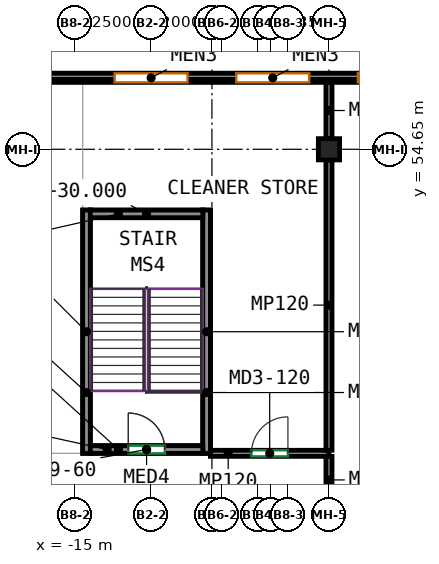
"""IFC4 building model, lengths in metres.
Left out: names, types, materials, properties, quantities, classifications, styles, units other than length and angle.
Written with IfcOpenShell. Run it as: python <this file> out.ifc"""

import sys

from ifc_helpers import new_model, si_unit, direction, frame, frame_2d, origin, origin_2d, place, context, subcontext, project, spatial, rectangle, extrude, source, transform, mapped, element, fill, save


model = new_model("IFC4")
c1 = context("Model", 3, precision=1e-05, world=origin(), true_north=direction((0.0, 1.0)))
c2 = subcontext(c1, "Body", "Model", "MODEL_VIEW")
j1 = project(units=[si_unit("LENGTHUNIT", "METRE"), si_unit("PLANEANGLEUNIT", "RADIAN")], contexts=[c1])
p1 = place(None, origin())
s1 = spatial("IfcSite", under=j1, at=p1, CompositionType="ELEMENT")
p2 = place(p1, origin())
s2 = spatial("IfcBuilding", under=s1, at=p2, CompositionType="ELEMENT")
p3 = place(p2, frame((0.0, 0.0, 22.5)))
s3 = spatial("IfcBuildingStorey", under=s2, at=p3, CompositionType="ELEMENT", Elevation=22.5)
m1 = source(origin(), c2, "Body", "SweptSolid", [
    extrude(rectangle(XDim=0.7, YDim=0.7, at=origin_2d()), origin(), (0.0, 0.0, 1.0), 4.22),
])
p4 = place(p3, frame((-6.65, 54.65, 0.0), z_axis=(0.0, 0.0, 1.0), x_axis=(1.0, 0.0, 0.0)))
e1 = element("IfcColumn", 1, at=p4, inside=s3, PredefinedType="COLUMN", context=c2, shape_type="MappedRepresentation", body=[
    mapped(m1, transform((0.0, 0.0, 0.0))),
])
m2 = source(origin(), c2, "Body", "SweptSolid", [
    extrude(rectangle(XDim=8.0, YDim=0.25, at=frame_2d((4.0, 0.0))), origin(), (0.0, 0.0, 1.0), 4.22),
])
for number, where, z_axis, x_axis in (
    (2, (-14.625, 44.65, 0.0), (0.0, 0.0, 1.0), (0.0, 1.0, 0.0)),
    (3, (-10.675, 44.65, 0.0), (0.0, 0.0, 1.0), (0.0, 1.0, 0.0)),
):
    element("IfcWall", number, at=place(p3, frame(where, z_axis=z_axis, x_axis=x_axis)), inside=s3, PredefinedType="SHEAR", context=c2, shape_type="MappedRepresentation", body=[
        mapped(m2, transform((0.0, 0.0, 0.0))),
    ])
m3 = source(origin(), c2, "Body", "SweptSolid", [
    extrude(rectangle(XDim=3.7, YDim=0.25, at=frame_2d((1.85, 0.0))), origin(), (0.0, 0.0, 1.0), 4.22),
])
p5 = place(p3, frame((-14.5, 44.775, 0.0), z_axis=(0.0, 0.0, 1.0), x_axis=(1.0, 0.0, 0.0)))
e4 = element("IfcWall", 4, at=p5, inside=s3, PredefinedType="SHEAR", context=c2, shape_type="MappedRepresentation", body=[
    mapped(m3, transform((0.0, 0.0, 0.0))),
])
p6 = place(p5, frame((1.25, 0.0, 0.0)))
e5 = element("IfcOpeningElement", 5, at=p6, cuts=e4, PredefinedType="OPENING", context=c2, shape_type="SweptSolid", body=[
    extrude(rectangle(XDim=1.2, YDim=2.1, at=frame_2d((0.6, 1.05))), frame((0.0, 0.135, 0.0), z_axis=(0.0, -1.0, 0.0), x_axis=(1.0, 0.0, 0.0)), (0.0, 0.0, 1.0), 0.27),
])
p7 = place(p3, frame((-14.5, 52.525, 0.0), z_axis=(0.0, 0.0, 1.0), x_axis=(1.0, 0.0, 0.0)))
e6 = element("IfcWall", 6, at=p7, inside=s3, PredefinedType="SHEAR", context=c2, shape_type="MappedRepresentation", body=[
    mapped(m3, transform((0.0, 0.0, 0.0))),
])
m4 = source(origin(), c2, "Body", "SweptSolid", [
    extrude(rectangle(XDim=112.7, YDim=0.3, at=frame_2d((56.35, 0.0))), origin(), (0.0, 0.0, 1.0), 4.22),
])
p8 = place(p3, frame((-56.85, 57.0, 0.0), z_axis=(0.0, 0.0, 1.0), x_axis=(1.0, 0.0, 0.0)))
e7 = element("IfcWall", 7, at=p8, inside=s3, PredefinedType="SOLIDWALL", context=c2, shape_type="MappedRepresentation", body=[
    mapped(m4, transform((0.0, 0.0, 0.0))),
])
p9 = place(p8, frame((3.15, 0.0, 0.9)))
e8 = element("IfcOpeningElement", 8, at=p9, cuts=e7, PredefinedType="OPENING", context=c2, shape_type="SweptSolid", body=[
    extrude(rectangle(XDim=2.4, YDim=1.8, at=frame_2d((1.2, 0.9))), frame((0.0, 0.16, 0.0), z_axis=(0.0, -1.0, 0.0), x_axis=(1.0, 0.0, 0.0)), (0.0, 0.0, 1.0), 0.32),
])
p10 = place(p8, frame((7.15, 0.0, 0.9)))
e9 = element("IfcOpeningElement", 9, at=p10, cuts=e7, PredefinedType="OPENING", context=c2, shape_type="SweptSolid", body=[
    extrude(rectangle(XDim=2.4, YDim=1.8, at=frame_2d((1.2, 0.9))), frame((0.0, 0.16, 0.0), z_axis=(0.0, -1.0, 0.0), x_axis=(1.0, 0.0, 0.0)), (0.0, 0.0, 1.0), 0.32),
])
p11 = place(p8, frame((11.15, 0.0, 0.9)))
e10 = element("IfcOpeningElement", 10, at=p11, cuts=e7, PredefinedType="OPENING", context=c2, shape_type="SweptSolid", body=[
    extrude(rectangle(XDim=2.4, YDim=1.8, at=frame_2d((1.2, 0.9))), frame((0.0, 0.16, 0.0), z_axis=(0.0, -1.0, 0.0), x_axis=(1.0, 0.0, 0.0)), (0.0, 0.0, 1.0), 0.32),
])
p12 = place(p8, frame((15.15, 0.0, 0.9)))
e11 = element("IfcOpeningElement", 11, at=p12, cuts=e7, PredefinedType="OPENING", context=c2, shape_type="SweptSolid", body=[
    extrude(rectangle(XDim=2.4, YDim=1.8, at=frame_2d((1.2, 0.9))), frame((0.0, 0.16, 0.0), z_axis=(0.0, -1.0, 0.0), x_axis=(1.0, 0.0, 0.0)), (0.0, 0.0, 1.0), 0.32),
])
p13 = place(p8, frame((19.15, 0.0, 0.9)))
e12 = element("IfcOpeningElement", 12, at=p13, cuts=e7, PredefinedType="OPENING", context=c2, shape_type="SweptSolid", body=[
    extrude(rectangle(XDim=2.4, YDim=1.8, at=frame_2d((1.2, 0.9))), frame((0.0, 0.16, 0.0), z_axis=(0.0, -1.0, 0.0), x_axis=(1.0, 0.0, 0.0)), (0.0, 0.0, 1.0), 0.32),
])
p14 = place(p8, frame((23.15, 0.0, 0.9)))
e13 = element("IfcOpeningElement", 13, at=p14, cuts=e7, PredefinedType="OPENING", context=c2, shape_type="SweptSolid", body=[
    extrude(rectangle(XDim=2.4, YDim=1.8, at=frame_2d((1.2, 0.9))), frame((0.0, 0.16, 0.0), z_axis=(0.0, -1.0, 0.0), x_axis=(1.0, 0.0, 0.0)), (0.0, 0.0, 1.0), 0.32),
])
p15 = place(p8, frame((27.15, 0.0, 0.9)))
e14 = element("IfcOpeningElement", 14, at=p15, cuts=e7, PredefinedType="OPENING", context=c2, shape_type="SweptSolid", body=[
    extrude(rectangle(XDim=2.4, YDim=1.8, at=frame_2d((1.2, 0.9))), frame((0.0, 0.16, 0.0), z_axis=(0.0, -1.0, 0.0), x_axis=(1.0, 0.0, 0.0)), (0.0, 0.0, 1.0), 0.32),
])
p16 = place(p8, frame((31.15, 0.0, 0.9)))
e15 = element("IfcOpeningElement", 15, at=p16, cuts=e7, PredefinedType="OPENING", context=c2, shape_type="SweptSolid", body=[
    extrude(rectangle(XDim=2.4, YDim=1.8, at=frame_2d((1.2, 0.9))), frame((0.0, 0.16, 0.0), z_axis=(0.0, -1.0, 0.0), x_axis=(1.0, 0.0, 0.0)), (0.0, 0.0, 1.0), 0.32),
])
p17 = place(p8, frame((35.15, 0.0, 0.9)))
e16 = element("IfcOpeningElement", 16, at=p17, cuts=e7, PredefinedType="OPENING", context=c2, shape_type="SweptSolid", body=[
    extrude(rectangle(XDim=2.4, YDim=1.8, at=frame_2d((1.2, 0.9))), frame((0.0, 0.16, 0.0), z_axis=(0.0, -1.0, 0.0), x_axis=(1.0, 0.0, 0.0)), (0.0, 0.0, 1.0), 0.32),
])
p18 = place(p8, frame((43.15, 0.0, 0.9)))
e17 = element("IfcOpeningElement", 17, at=p18, cuts=e7, PredefinedType="OPENING", context=c2, shape_type="SweptSolid", body=[
    extrude(rectangle(XDim=2.4, YDim=1.8, at=frame_2d((1.2, 0.9))), frame((0.0, 0.16, 0.0), z_axis=(0.0, -1.0, 0.0), x_axis=(1.0, 0.0, 0.0)), (0.0, 0.0, 1.0), 0.32),
])
p19 = place(p8, frame((47.15, 0.0, 0.9)))
e18 = element("IfcOpeningElement", 18, at=p19, cuts=e7, PredefinedType="OPENING", context=c2, shape_type="SweptSolid", body=[
    extrude(rectangle(XDim=2.4, YDim=1.8, at=frame_2d((1.2, 0.9))), frame((0.0, 0.16, 0.0), z_axis=(0.0, -1.0, 0.0), x_axis=(1.0, 0.0, 0.0)), (0.0, 0.0, 1.0), 0.32),
])
p20 = place(p8, frame((51.15, 0.0, 0.9)))
e19 = element("IfcOpeningElement", 19, at=p20, cuts=e7, PredefinedType="OPENING", context=c2, shape_type="SweptSolid", body=[
    extrude(rectangle(XDim=2.4, YDim=1.8, at=frame_2d((1.2, 0.9))), frame((0.0, 0.16, 0.0), z_axis=(0.0, -1.0, 0.0), x_axis=(1.0, 0.0, 0.0)), (0.0, 0.0, 1.0), 0.32),
])
p21 = place(p8, frame((55.15, 0.0, 0.9)))
e20 = element("IfcOpeningElement", 20, at=p21, cuts=e7, PredefinedType="OPENING", context=c2, shape_type="SweptSolid", body=[
    extrude(rectangle(XDim=2.4, YDim=1.8, at=frame_2d((1.2, 0.9))), frame((0.0, 0.16, 0.0), z_axis=(0.0, -1.0, 0.0), x_axis=(1.0, 0.0, 0.0)), (0.0, 0.0, 1.0), 0.32),
])
p22 = place(p8, frame((59.15, 0.0, 0.9)))
e21 = element("IfcOpeningElement", 21, at=p22, cuts=e7, PredefinedType="OPENING", context=c2, shape_type="SweptSolid", body=[
    extrude(rectangle(XDim=2.4, YDim=1.8, at=frame_2d((1.2, 0.9))), frame((0.0, 0.16, 0.0), z_axis=(0.0, -1.0, 0.0), x_axis=(1.0, 0.0, 0.0)), (0.0, 0.0, 1.0), 0.32),
])
p23 = place(p8, frame((63.15, 0.0, 0.9)))
e22 = element("IfcOpeningElement", 22, at=p23, cuts=e7, PredefinedType="OPENING", context=c2, shape_type="SweptSolid", body=[
    extrude(rectangle(XDim=2.4, YDim=1.8, at=frame_2d((1.2, 0.9))), frame((0.0, 0.16, 0.0), z_axis=(0.0, -1.0, 0.0), x_axis=(1.0, 0.0, 0.0)), (0.0, 0.0, 1.0), 0.32),
])
p24 = place(p8, frame((67.15, 0.0, 0.9)))
e23 = element("IfcOpeningElement", 23, at=p24, cuts=e7, PredefinedType="OPENING", context=c2, shape_type="SweptSolid", body=[
    extrude(rectangle(XDim=2.4, YDim=1.8, at=frame_2d((1.2, 0.9))), frame((0.0, 0.16, 0.0), z_axis=(0.0, -1.0, 0.0), x_axis=(1.0, 0.0, 0.0)), (0.0, 0.0, 1.0), 0.32),
])
p25 = place(p8, frame((71.15, 0.0, 0.9)))
e24 = element("IfcOpeningElement", 24, at=p25, cuts=e7, PredefinedType="OPENING", context=c2, shape_type="SweptSolid", body=[
    extrude(rectangle(XDim=2.4, YDim=1.8, at=frame_2d((1.2, 0.9))), frame((0.0, 0.16, 0.0), z_axis=(0.0, -1.0, 0.0), x_axis=(1.0, 0.0, 0.0)), (0.0, 0.0, 1.0), 0.32),
])
p26 = place(p8, frame((75.15, 0.0, 0.9)))
e25 = element("IfcOpeningElement", 25, at=p26, cuts=e7, PredefinedType="OPENING", context=c2, shape_type="SweptSolid", body=[
    extrude(rectangle(XDim=2.4, YDim=1.8, at=frame_2d((1.2, 0.9))), frame((0.0, 0.16, 0.0), z_axis=(0.0, -1.0, 0.0), x_axis=(1.0, 0.0, 0.0)), (0.0, 0.0, 1.0), 0.32),
])
p27 = place(p8, frame((79.15, 0.0, 0.9)))
e26 = element("IfcOpeningElement", 26, at=p27, cuts=e7, PredefinedType="OPENING", context=c2, shape_type="SweptSolid", body=[
    extrude(rectangle(XDim=2.4, YDim=1.8, at=frame_2d((1.2, 0.9))), frame((0.0, 0.16, 0.0), z_axis=(0.0, -1.0, 0.0), x_axis=(1.0, 0.0, 0.0)), (0.0, 0.0, 1.0), 0.32),
])
p28 = place(p8, frame((83.15, 0.0, 0.9)))
e27 = element("IfcOpeningElement", 27, at=p28, cuts=e7, PredefinedType="OPENING", context=c2, shape_type="SweptSolid", body=[
    extrude(rectangle(XDim=2.4, YDim=1.8, at=frame_2d((1.2, 0.9))), frame((0.0, 0.16, 0.0), z_axis=(0.0, -1.0, 0.0), x_axis=(1.0, 0.0, 0.0)), (0.0, 0.0, 1.0), 0.32),
])
p29 = place(p8, frame((87.15, 0.0, 0.9)))
e28 = element("IfcOpeningElement", 28, at=p29, cuts=e7, PredefinedType="OPENING", context=c2, shape_type="SweptSolid", body=[
    extrude(rectangle(XDim=2.4, YDim=1.8, at=frame_2d((1.2, 0.9))), frame((0.0, 0.16, 0.0), z_axis=(0.0, -1.0, 0.0), x_axis=(1.0, 0.0, 0.0)), (0.0, 0.0, 1.0), 0.32),
])
p30 = place(p8, frame((91.15, 0.0, 0.9)))
e29 = element("IfcOpeningElement", 29, at=p30, cuts=e7, PredefinedType="OPENING", context=c2, shape_type="SweptSolid", body=[
    extrude(rectangle(XDim=2.4, YDim=1.8, at=frame_2d((1.2, 0.9))), frame((0.0, 0.16, 0.0), z_axis=(0.0, -1.0, 0.0), x_axis=(1.0, 0.0, 0.0)), (0.0, 0.0, 1.0), 0.32),
])
p31 = place(p8, frame((95.15, 0.0, 0.9)))
e30 = element("IfcOpeningElement", 30, at=p31, cuts=e7, PredefinedType="OPENING", context=c2, shape_type="SweptSolid", body=[
    extrude(rectangle(XDim=2.4, YDim=1.8, at=frame_2d((1.2, 0.9))), frame((0.0, 0.16, 0.0), z_axis=(0.0, -1.0, 0.0), x_axis=(1.0, 0.0, 0.0)), (0.0, 0.0, 1.0), 0.32),
])
p32 = place(p8, frame((103.15, 0.0, 0.9)))
e31 = element("IfcOpeningElement", 31, at=p32, cuts=e7, PredefinedType="OPENING", context=c2, shape_type="SweptSolid", body=[
    extrude(rectangle(XDim=2.4, YDim=1.8, at=frame_2d((1.2, 0.9))), frame((0.0, 0.16, 0.0), z_axis=(0.0, -1.0, 0.0), x_axis=(1.0, 0.0, 0.0)), (0.0, 0.0, 1.0), 0.32),
])
p33 = place(p8, frame((107.15, 0.0, 0.9)))
e32 = element("IfcOpeningElement", 32, at=p33, cuts=e7, PredefinedType="OPENING", context=c2, shape_type="SweptSolid", body=[
    extrude(rectangle(XDim=2.4, YDim=1.8, at=frame_2d((1.2, 0.9))), frame((0.0, 0.16, 0.0), z_axis=(0.0, -1.0, 0.0), x_axis=(1.0, 0.0, 0.0)), (0.0, 0.0, 1.0), 0.32),
])
m5 = source(origin(), c2, "Body", "SweptSolid", [
    extrude(rectangle(XDim=112.8, YDim=0.2, at=frame_2d((56.4, 0.0))), origin(), (0.0, 0.0, 1.0), 1.1),
])
p34 = place(p3, frame((-56.95, 57.05, 4.5), z_axis=(0.0, 0.0, 1.0), x_axis=(1.0, 0.0, 0.0)))
e33 = element("IfcWall", 33, at=p34, inside=s3, PredefinedType="PARAPET", context=c2, shape_type="MappedRepresentation", body=[
    mapped(m5, transform((0.0, 0.0, 0.0))),
])
m6 = source(origin(), c2, "Body", "SweptSolid", [
    extrude(rectangle(XDim=8.0, YDim=0.25, at=frame_2d((4.0, 0.0))), origin(), (0.0, 0.0, 1.0), 3.0),
])
for number, where, z_axis, x_axis in (
    (34, (-14.625, 44.65, 4.5), (0.0, 0.0, 1.0), (0.0, 1.0, 0.0)),
    (35, (-10.675, 44.65, 4.5), (0.0, 0.0, 1.0), (0.0, 1.0, 0.0)),
):
    element("IfcWall", number, at=place(p3, frame(where, z_axis=z_axis, x_axis=x_axis)), inside=s3, PredefinedType="SOLIDWALL", context=c2, shape_type="MappedRepresentation", body=[
        mapped(m6, transform((0.0, 0.0, 0.0))),
    ])
m7 = source(origin(), c2, "Body", "SweptSolid", [
    extrude(rectangle(XDim=3.7, YDim=0.25, at=frame_2d((1.85, 0.0))), origin(), (0.0, 0.0, 1.0), 3.0),
])
p35 = place(p3, frame((-14.5, 44.775, 4.5), z_axis=(0.0, 0.0, 1.0), x_axis=(1.0, 0.0, 0.0)))
e36 = element("IfcWall", 36, at=p35, inside=s3, PredefinedType="SOLIDWALL", context=c2, shape_type="MappedRepresentation", body=[
    mapped(m7, transform((0.0, 0.0, 0.0))),
])
p36 = place(p35, frame((1.25, 0.0, 0.0)))
e37 = element("IfcOpeningElement", 37, at=p36, cuts=e36, PredefinedType="OPENING", context=c2, shape_type="SweptSolid", body=[
    extrude(rectangle(XDim=1.2, YDim=2.1, at=frame_2d((0.6, 1.05))), frame((0.0, 0.135, 0.0), z_axis=(0.0, -1.0, 0.0), x_axis=(1.0, 0.0, 0.0)), (0.0, 0.0, 1.0), 0.27),
])
p37 = place(p3, frame((-14.5, 52.525, 4.5), z_axis=(0.0, 0.0, 1.0), x_axis=(1.0, 0.0, 0.0)))
e38 = element("IfcWall", 38, at=p37, inside=s3, PredefinedType="SOLIDWALL", context=c2, shape_type="MappedRepresentation", body=[
    mapped(m7, transform((0.0, 0.0, 0.0))),
])
m8 = source(origin(), c2, "Body", "SweptSolid", [
    extrude(rectangle(XDim=3.9, YDim=0.2, at=frame_2d((1.95, 0.0))), origin(), (0.0, 0.0, 1.0), 3.42),
])
p38 = place(p3, frame((-10.55, 44.65, 0.0), z_axis=(0.0, 0.0, 1.0), x_axis=(1.0, 0.0, 0.0)))
e39 = element("IfcWall", 39, at=p38, inside=s3, PredefinedType="PARTITIONING", context=c2, shape_type="MappedRepresentation", body=[
    mapped(m8, transform((0.0, 0.0, 0.0))),
])
p39 = place(p38, frame((1.35, 0.0, 0.0)))
e40 = element("IfcOpeningElement", 40, at=p39, cuts=e39, PredefinedType="OPENING", context=c2, shape_type="SweptSolid", body=[
    extrude(rectangle(XDim=1.2, YDim=2.1, at=frame_2d((0.6, 1.05))), frame((0.0, 0.11, 0.0), z_axis=(0.0, -1.0, 0.0), x_axis=(1.0, 0.0, 0.0)), (0.0, 0.0, 1.0), 0.22),
])
m9 = source(origin(), c2, "Body", "SweptSolid", [
    extrude(rectangle(XDim=1.55, YDim=0.2, at=frame_2d((0.775, 0.0))), origin(), (0.0, 0.0, 1.0), 3.42),
])
p40 = place(p3, frame((-6.65, 44.55, 0.0), z_axis=(0.0, 0.0, 1.0), x_axis=(0.0, -1.0, 0.0)))
e41 = element("IfcWall", 41, at=p40, inside=s3, PredefinedType="PARTITIONING", context=c2, shape_type="MappedRepresentation", body=[
    mapped(m9, transform((0.0, 0.0, 0.0))),
])
m10 = source(origin(), c2, "Body", "SweptSolid", [
    extrude(rectangle(XDim=9.55, YDim=0.2, at=frame_2d((4.775, 0.0))), origin(), (0.0, 0.0, 1.0), 3.42),
])
p41 = place(p3, frame((-6.65, 54.3, 0.0), z_axis=(0.0, 0.0, 1.0), x_axis=(0.0, -1.0, 0.0)))
e42 = element("IfcWall", 42, at=p41, inside=s3, PredefinedType="PARTITIONING", context=c2, shape_type="MappedRepresentation", body=[
    mapped(m10, transform((0.0, 0.0, 0.0))),
])
m11 = source(origin(), c2, "Body", "SweptSolid", [
    extrude(rectangle(XDim=1.85, YDim=0.2, at=frame_2d((0.925, 0.0))), origin(), (0.0, 0.0, 1.0), 4.22),
])
p42 = place(p3, frame((-6.65, 56.85, 0.0), z_axis=(0.0, 0.0, 1.0), x_axis=(0.0, -1.0, 0.0)))
e43 = element("IfcWall", 43, at=p42, inside=s3, PredefinedType="PARTITIONING", context=c2, shape_type="MappedRepresentation", body=[
    mapped(m11, transform((0.0, 0.0, 0.0))),
])
p43 = place(p18, origin())
e44 = element("IfcWindow", 44, at=p43, inside=s3, PartitioningType="SINGLE_PANEL", PredefinedType="WINDOW", context=c2, shape_type="SweptSolid", body=[
    extrude(rectangle(XDim=2.4, YDim=1.8, at=frame_2d((1.2, 0.9))), frame((0.0, 0.03, 0.0), z_axis=(0.0, -1.0, 0.0), x_axis=(1.0, 0.0, 0.0)), (0.0, 0.0, 1.0), 0.06),
])
fill(e17, e44)
p44 = place(p19, origin())
e45 = element("IfcWindow", 45, at=p44, inside=s3, PartitioningType="SINGLE_PANEL", PredefinedType="WINDOW", context=c2, shape_type="SweptSolid", body=[
    extrude(rectangle(XDim=2.4, YDim=1.8, at=frame_2d((1.2, 0.9))), frame((0.0, 0.03, 0.0), z_axis=(0.0, -1.0, 0.0), x_axis=(1.0, 0.0, 0.0)), (0.0, 0.0, 1.0), 0.06),
])
fill(e18, e45)
p45 = place(p20, origin())
e46 = element("IfcWindow", 46, at=p45, inside=s3, PartitioningType="SINGLE_PANEL", PredefinedType="WINDOW", context=c2, shape_type="SweptSolid", body=[
    extrude(rectangle(XDim=2.4, YDim=1.8, at=frame_2d((1.2, 0.9))), frame((0.0, 0.03, 0.0), z_axis=(0.0, -1.0, 0.0), x_axis=(1.0, 0.0, 0.0)), (0.0, 0.0, 1.0), 0.06),
])
fill(e19, e46)
p46 = place(p36, origin())
e47 = element("IfcDoor", 47, at=p46, inside=s3, OperationType="DOUBLE_DOOR_SINGLE_SWING", PredefinedType="DOOR", context=c2, shape_type="SweptSolid", body=[
    extrude(rectangle(XDim=1.2, YDim=2.1, at=frame_2d((0.6, 1.05))), frame((0.0, 0.025, 0.0), z_axis=(0.0, -1.0, 0.0), x_axis=(1.0, 0.0, 0.0)), (0.0, 0.0, 1.0), 0.05),
])
fill(e37, e47)
p47 = place(p6, origin())
e48 = element("IfcDoor", 48, at=p47, inside=s3, OperationType="DOUBLE_DOOR_SINGLE_SWING", PredefinedType="DOOR", context=c2, shape_type="SweptSolid", body=[
    extrude(rectangle(XDim=1.2, YDim=2.1, at=frame_2d((0.6, 1.05))), frame((0.0, 0.025, 0.0), z_axis=(0.0, -1.0, 0.0), x_axis=(1.0, 0.0, 0.0)), (0.0, 0.0, 1.0), 0.05),
])
fill(e5, e48)
p48 = place(p39, origin())
e49 = element("IfcDoor", 49, at=p48, inside=s3, OperationType="SINGLE_SWING_RIGHT", PredefinedType="DOOR", context=c2, shape_type="SweptSolid", body=[
    extrude(rectangle(XDim=1.2, YDim=2.1, at=frame_2d((0.6, 1.05))), frame((0.0, 0.025, 0.0), z_axis=(0.0, -1.0, 0.0), x_axis=(1.0, 0.0, 0.0)), (0.0, 0.0, 1.0), 0.05),
])
fill(e40, e49)
save(model, sys.argv[1])
